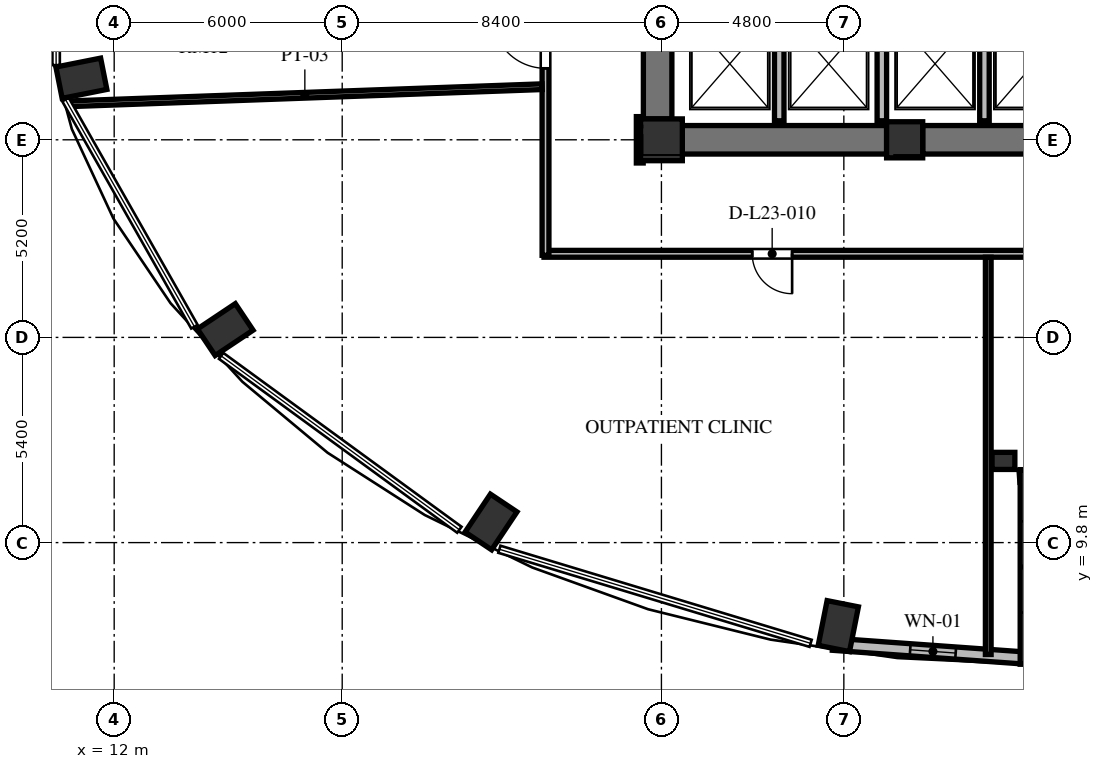
"""IFC4 building model, lengths in metres.
Left out: names, types, materials, properties, quantities, classifications, styles, units other than length and angle.
Written with IfcOpenShell. Run it as: python <this file> out.ifc"""

import sys

from ifc_helpers import new_model, si_unit, direction, frame, frame_2d, origin, origin_2d, place, context, subcontext, project, spatial, rectangle, extrude, element, fill, save


model = new_model("IFC4")
c1 = context("Model", 3, precision=1e-05, world=origin(), true_north=direction((0.0, 1.0)))
c2 = subcontext(c1, "Body", "Model", "MODEL_VIEW")
j1 = project(units=[si_unit("LENGTHUNIT", "METRE"), si_unit("PLANEANGLEUNIT", "RADIAN")], contexts=[c1])
p1 = place(None, origin())
s1 = spatial("IfcSite", under=j1, at=p1, CompositionType="ELEMENT")
p2 = place(p1, origin())
s2 = spatial("IfcBuilding", under=s1, at=p2, CompositionType="ELEMENT")
p3 = place(p2, frame((0.0, 0.0, 92.688)))
s3 = spatial("IfcBuildingStorey", under=s2, at=p3, CompositionType="ELEMENT", Elevation=92.688)
for number, where, z_axis, x_axis in (
    (1, (11.137, 22.02, 0.0), (0.0, 0.0, 1.0), (-0.981, -0.195, 0.0)),
    (2, (14.922, 15.405, 0.0), (0.0, 0.0, 1.0), (-0.831, -0.556, 0.0)),
    (3, (21.916, 10.343, 0.0), (0.0, 0.0, 1.0), (-0.556, -0.831, 0.0)),
    (4, (31.054, 7.603, 0.0), (0.0, 0.0, 1.0), (-0.195, -0.981, 0.0)),
):
    element("IfcColumn", number, at=place(p3, frame(where, z_axis=z_axis, x_axis=x_axis)), inside=s3, PredefinedType="COLUMN", context=c2, shape_type="SweptSolid", body=[
        extrude(rectangle(XDim=1.2, YDim=0.84, at=origin_2d()), origin(), (0.0, 0.0, 1.0), 3.648),
    ])
p4 = place(p3, frame((26.4, 20.4, 0.0), z_axis=(0.0, 0.0, 1.0), x_axis=(1.0, 0.0, 0.0)))
e5 = element("IfcColumn", 5, at=p4, inside=s3, PredefinedType="COLUMN", context=c2, shape_type="SweptSolid", body=[
    extrude(rectangle(XDim=1.1, YDim=1.1, at=origin_2d()), origin(), (0.0, 0.0, 1.0), 3.648),
])
p5 = place(p3, frame((32.8, 20.4, 0.0), z_axis=(0.0, 0.0, 1.0), x_axis=(1.0, 0.0, 0.0)))
e6 = element("IfcColumn", 6, at=p5, inside=s3, PredefinedType="COLUMN", context=c2, shape_type="SweptSolid", body=[
    extrude(rectangle(XDim=0.95, YDim=0.95, at=origin_2d()), origin(), (0.0, 0.0, 1.0), 3.648),
])
p6 = place(p3, frame((35.4, 11.95, 0.0), z_axis=(0.0, 0.0, 1.0), x_axis=(1.0, 0.0, 0.0)))
e7 = element("IfcColumn", 7, at=p6, inside=s3, PredefinedType="PILASTER", context=c2, shape_type="SweptSolid", body=[
    extrude(rectangle(XDim=0.6, YDim=0.45, at=origin_2d()), origin(), (0.0, 0.0, 1.0), 3.648),
])
p7 = place(p3, frame((26.3, 20.95, 0.0), z_axis=(0.0, 0.0, 1.0), x_axis=(0.0, 1.0, 0.0)))
e8 = element("IfcWall", 8, at=p7, inside=s3, PredefinedType="SHEAR", context=c2, shape_type="SweptSolid", body=[
    extrude(rectangle(XDim=14.1, YDim=0.75, at=frame_2d((7.05, 0.0))), origin(), (0.0, 0.0, 1.0), 3.648),
])
p8 = place(p7, frame((6.5, 0.0, 0.0)))
e9 = element("IfcOpeningElement", 9, at=p8, cuts=e8, PredefinedType="OPENING", context=c2, shape_type="SweptSolid", body=[
    extrude(rectangle(XDim=1.2, YDim=2.15, at=frame_2d((0.6, 1.075))), frame((0.0, 0.385, 0.0), z_axis=(0.0, -1.0, 0.0), x_axis=(1.0, 0.0, 0.0)), (0.0, 0.0, 1.0), 0.77),
])
p9 = place(p7, frame((9.6, 0.0, 0.0)))
e10 = element("IfcOpeningElement", 10, at=p9, cuts=e8, PredefinedType="OPENING", context=c2, shape_type="SweptSolid", body=[
    extrude(rectangle(XDim=1.3, YDim=2.2, at=frame_2d((0.65, 1.1))), frame((0.0, 0.385, 0.0), z_axis=(0.0, -1.0, 0.0), x_axis=(1.0, 0.0, 0.0)), (0.0, 0.0, 1.0), 0.77),
])
p10 = place(p7, frame((3.26, 0.0, 0.0)))
e11 = element("IfcOpeningElement", 11, at=p10, cuts=e8, PredefinedType="OPENING", context=c2, shape_type="SweptSolid", body=[
    extrude(rectangle(XDim=1.3, YDim=2.2, at=frame_2d((0.65, 1.1))), frame((0.0, 0.385, 0.0), z_axis=(0.0, -1.0, 0.0), x_axis=(1.0, 0.0, 0.0)), (0.0, 0.0, 1.0), 0.77),
])
p11 = place(p3, frame((26.95, 20.4, 0.0), z_axis=(0.0, 0.0, 1.0), x_axis=(1.0, 0.0, 0.0)))
e12 = element("IfcWall", 12, at=p11, inside=s3, PredefinedType="SHEAR", context=c2, shape_type="SweptSolid", body=[
    extrude(rectangle(XDim=5.375, YDim=0.75, at=frame_2d((2.688, 0.0))), origin(), (0.0, 0.0, 1.0), 3.648),
])
p12 = place(p3, frame((33.275, 20.4, 0.0), z_axis=(0.0, 0.0, 1.0), x_axis=(1.0, 0.0, 0.0)))
e13 = element("IfcWall", 13, at=p12, inside=s3, PredefinedType="SHEAR", context=c2, shape_type="SweptSolid", body=[
    extrude(rectangle(XDim=5.45, YDim=0.75, at=frame_2d((2.725, 0.0))), origin(), (0.0, 0.0, 1.0), 3.648),
])
p13 = place(p3, frame((35.821, 11.547, 0.0), z_axis=(0.0, 0.0, 1.0), x_axis=(0.997432364291, 0.071614793619, 0.0)))
e14 = element("IfcWall", 14, at=p13, inside=s3, PredefinedType="SOLIDWALL", context=c2, shape_type="SweptSolid", body=[
    extrude(rectangle(XDim=5.284, YDim=0.32, at=frame_2d((2.642, 0.0))), origin(), (0.0, 0.0, 1.0), 3.428),
])
p14 = place(p13, frame((2.042, 0.0, 0.85)))
e15 = element("IfcOpeningElement", 15, at=p14, cuts=e14, PredefinedType="OPENING", context=c2, shape_type="SweptSolid", body=[
    extrude(rectangle(XDim=1.2, YDim=1.8, at=frame_2d((0.6, 0.9))), frame((0.0, 0.17, 0.0), z_axis=(0.0, -1.0, 0.0), x_axis=(1.0, 0.0, 0.0)), (0.0, 0.0, 1.0), 0.34),
])
p15 = place(p3, frame((30.909, 7.125, 0.0), z_axis=(0.0, 0.0, 1.0), x_axis=(0.997431890304, -0.071621394884, 0.0)))
e16 = element("IfcWall", 16, at=p15, inside=s3, PredefinedType="SOLIDWALL", context=c2, shape_type="SweptSolid", body=[
    extrude(rectangle(XDim=5.284, YDim=0.32, at=frame_2d((2.642, 0.0))), origin(), (0.0, 0.0, 1.0), 3.428),
])
p16 = place(p15, frame((2.042, 0.0, 0.85)))
e17 = element("IfcOpeningElement", 17, at=p16, cuts=e16, PredefinedType="OPENING", context=c2, shape_type="SweptSolid", body=[
    extrude(rectangle(XDim=1.2, YDim=2.2, at=frame_2d((0.6, 1.1))), frame((0.0, 0.17, 0.0), z_axis=(0.0, -1.0, 0.0), x_axis=(1.0, 0.0, 0.0)), (0.0, 0.0, 1.0), 0.34),
])
p17 = place(p3, frame((36.0, 6.6, 0.0), z_axis=(0.0, 0.0, 1.0), x_axis=(0.0, 1.0, 0.0)))
e18 = element("IfcWall", 18, at=p17, inside=s3, PredefinedType="SOLIDWALL", context=c2, shape_type="SweptSolid", body=[
    extrude(rectangle(XDim=5.12, YDim=0.32, at=frame_2d((2.56, 0.0))), origin(), (0.0, 0.0, 1.0), 3.428),
])
p18 = place(p17, frame((1.36, 0.0, 0.84)))
e19 = element("IfcOpeningElement", 19, at=p18, cuts=e18, PredefinedType="OPENING", context=c2, shape_type="SweptSolid", body=[
    extrude(rectangle(XDim=2.4, YDim=2.04, at=frame_2d((1.2, 1.02))), frame((0.0, 0.17, 0.0), z_axis=(0.0, -1.0, 0.0), x_axis=(1.0, 0.0, 0.0)), (0.0, 0.0, 1.0), 0.34),
])
for number, where, z_axis, x_axis in (
    (20, (29.5, 20.9, 0.0), (0.0, 0.0, 1.0), (0.0, 1.0, 0.0)),
    (21, (32.2, 20.9, 0.0), (0.0, 0.0, 1.0), (0.0, 1.0, 0.0)),
    (22, (34.9, 20.9, 0.0), (0.0, 0.0, 1.0), (0.0, 1.0, 0.0)),
):
    element("IfcWall", number, at=place(p3, frame(where, z_axis=z_axis, x_axis=x_axis)), inside=s3, PredefinedType="SOLIDWALL", context=c2, shape_type="SweptSolid", body=[
        extrude(rectangle(XDim=2.8, YDim=0.25, at=frame_2d((1.4, 0.0))), origin(), (0.0, 0.0, 1.0), 3.428),
    ])
p19 = place(p3, frame((25.83, 21.01, 0.0), z_axis=(0.0, 0.0, 1.0), x_axis=(0.0, -1.0, 0.0)))
e23 = element("IfcWall", 23, at=p19, inside=s3, PredefinedType="PARTITIONING", context=c2, shape_type="SweptSolid", body=[
    extrude(rectangle(XDim=1.22, YDim=0.18, at=frame_2d((0.61, 0.0))), origin(), (0.0, 0.0, 1.0), 3.428),
])
p20 = place(p3, frame((45.24, 17.4, 0.0), z_axis=(0.0, 0.0, 1.0), x_axis=(-1.0, 0.0, 0.0)))
e24 = element("IfcWall", 24, at=p20, inside=s3, PredefinedType="PARTITIONING", context=c2, shape_type="SweptSolid", body=[
    extrude(rectangle(XDim=21.93, YDim=0.18, at=frame_2d((10.965, 0.0))), origin(), (0.0, 0.0, 1.0), 3.053),
])
p21 = place(p20, frame((15.401, 0.0, 0.0)))
e25 = element("IfcOpeningElement", 25, at=p21, cuts=e24, PredefinedType="OPENING", context=c2, shape_type="SweptSolid", body=[
    extrude(rectangle(XDim=1.05, YDim=2.15, at=frame_2d((0.525, 1.075))), frame((0.0, 0.1, 0.0), z_axis=(0.0, -1.0, 0.0), x_axis=(1.0, 0.0, 0.0)), (0.0, 0.0, 1.0), 0.2),
])
p22 = place(p20, frame((4.754, 0.0, 0.0)))
e26 = element("IfcOpeningElement", 26, at=p22, cuts=e24, PredefinedType="OPENING", context=c2, shape_type="SweptSolid", body=[
    extrude(rectangle(XDim=1.05, YDim=2.15, at=frame_2d((0.525, 1.075))), frame((0.0, 0.1, 0.0), z_axis=(0.0, -1.0, 0.0), x_axis=(1.0, 0.0, 0.0)), (0.0, 0.0, 1.0), 0.2),
])
p23 = place(p3, frame((23.35, 17.36, 0.0), z_axis=(0.0, 0.0, 1.0), x_axis=(0.0, 1.0, 0.0)))
e27 = element("IfcWall", 27, at=p23, inside=s3, PredefinedType="PARTITIONING", context=c2, shape_type="SweptSolid", body=[
    extrude(rectangle(XDim=9.28, YDim=0.18, at=frame_2d((4.64, 0.0))), origin(), (0.0, 0.0, 1.0), 3.428),
])
p24 = place(p23, frame((4.921, 0.0, 0.0)))
e28 = element("IfcOpeningElement", 28, at=p24, cuts=e27, PredefinedType="OPENING", context=c2, shape_type="SweptSolid", body=[
    extrude(rectangle(XDim=1.4, YDim=2.2, at=frame_2d((0.7, 1.1))), frame((0.0, 0.1, 0.0), z_axis=(0.0, -1.0, 0.0), x_axis=(1.0, 0.0, 0.0)), (0.0, 0.0, 1.0), 0.2),
])
p25 = place(p3, frame((10.774, 21.346, 0.0), z_axis=(0.0, 0.0, 1.0), x_axis=(0.999347780952, 0.036111116092, 0.0)))
e29 = element("IfcWall", 29, at=p25, inside=s3, PredefinedType="PARTITIONING", context=c2, shape_type="SweptSolid", body=[
    extrude(rectangle(XDim=12.494, YDim=0.15, at=frame_2d((6.247, 0.0))), origin(), (0.0, 0.0, 1.0), 2.813),
])
p26 = place(p3, frame((35.0, 6.856, 0.0), z_axis=(0.0, 0.0, 1.0), x_axis=(0.0, 1.0, 0.0)))
e30 = element("IfcWall", 30, at=p26, inside=s3, PredefinedType="PARTITIONING", context=c2, shape_type="SweptSolid", body=[
    extrude(rectangle(XDim=10.454, YDim=0.15, at=frame_2d((5.227, 0.0))), origin(), (0.0, 0.0, 1.0), 3.428),
])
p27 = place(p16, origin())
e31 = element("IfcWindow", 31, at=p27, inside=s3, PartitioningType="SINGLE_PANEL", PredefinedType="WINDOW", context=c2, shape_type="SweptSolid", body=[
    extrude(rectangle(XDim=1.2, YDim=2.2, at=frame_2d((0.6, 1.1))), frame((0.0, 0.03, 0.0), z_axis=(0.0, -1.0, 0.0), x_axis=(1.0, 0.0, 0.0)), (0.0, 0.0, 1.0), 0.06),
])
fill(e17, e31)
p28 = place(p24, origin())
e32 = element("IfcDoor", 32, at=p28, inside=s3, OperationType="SINGLE_SWING_RIGHT", PredefinedType="DOOR", context=c2, shape_type="SweptSolid", body=[
    extrude(rectangle(XDim=1.4, YDim=2.2, at=frame_2d((0.7, 1.1))), frame((0.0, 0.025, 0.0), z_axis=(0.0, -1.0, 0.0), x_axis=(1.0, 0.0, 0.0)), (0.0, 0.0, 1.0), 0.05),
])
fill(e28, e32)
p29 = place(p21, origin())
e33 = element("IfcDoor", 33, at=p29, inside=s3, OperationType="SINGLE_SWING_LEFT", PredefinedType="DOOR", context=c2, shape_type="SweptSolid", body=[
    extrude(rectangle(XDim=1.05, YDim=2.15, at=frame_2d((0.525, 1.075))), frame((0.0, 0.025, 0.0), z_axis=(0.0, -1.0, 0.0), x_axis=(1.0, 0.0, 0.0)), (0.0, 0.0, 1.0), 0.05),
])
fill(e25, e33)
save(model, sys.argv[1])
